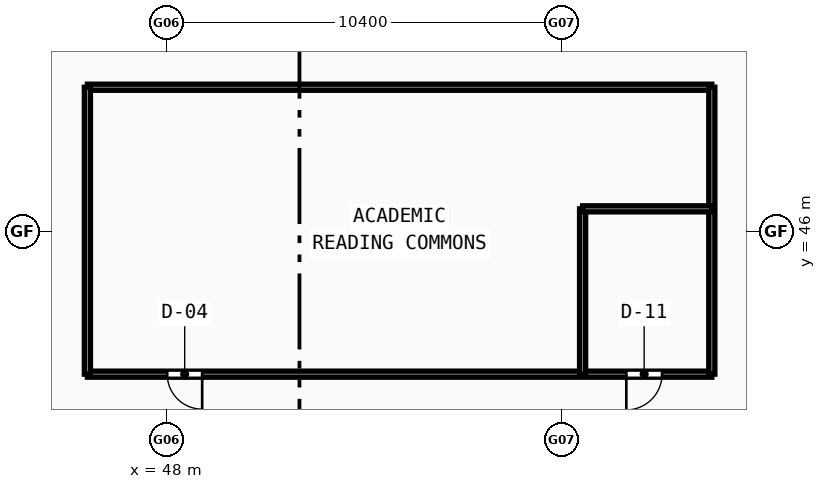
"""IFC4 building model, lengths in metres.
Left out: names, types, materials, properties, quantities, classifications, styles, units other than length and angle.
Written with IfcOpenShell. Run it as: python <this file> out.ifc"""

import sys

from ifc_helpers import new_model, si_unit, direction, frame, frame_2d, origin, place, context, subcontext, project, spatial, rectangle, extrude, source, transform, mapped, element, fill, save


model = new_model("IFC4")
c1 = context("Model", 3, precision=1e-05, world=origin(), true_north=direction((0.0, 1.0)))
c2 = subcontext(c1, "Body", "Model", "MODEL_VIEW")
j1 = project(units=[si_unit("LENGTHUNIT", "METRE"), si_unit("PLANEANGLEUNIT", "RADIAN")], contexts=[c1])
p1 = place(None, origin())
s1 = spatial("IfcSite", under=j1, at=p1, CompositionType="ELEMENT")
p2 = place(p1, origin())
s2 = spatial("IfcBuilding", under=s1, at=p2, CompositionType="ELEMENT")
p3 = place(p2, frame((0.0, 0.0, 84.98)))
s3 = spatial("IfcBuildingStorey", under=s2, at=p3, CompositionType="ELEMENT", Elevation=84.98)
p4 = place(p3, frame((45.92, 42.25, 0.0), z_axis=(0.0, 0.0, 1.0), x_axis=(1.0, 0.0, 0.0)))
e1 = element("IfcWall", 1, at=p4, inside=s3, PredefinedType="PARTITIONING", context=c2, shape_type="SweptSolid", body=[
    extrude(rectangle(XDim=16.43, YDim=0.16, at=frame_2d((8.215, 0.0))), origin(), (0.0, 0.0, 1.0), 2.84),
])
p5 = place(p4, frame((2.1, 0.0, 0.0)))
e2 = element("IfcOpeningElement", 2, at=p5, cuts=e1, PredefinedType="OPENING", context=c2, shape_type="SweptSolid", body=[
    extrude(rectangle(XDim=0.92, YDim=2.1, at=frame_2d((0.46, 1.05))), frame((0.0, 0.09, 0.0), z_axis=(0.0, -1.0, 0.0), x_axis=(1.0, 0.0, 0.0)), (0.0, 0.0, 1.0), 0.18),
])
p6 = place(p4, frame((14.18, 0.0, 0.0)))
e3 = element("IfcOpeningElement", 3, at=p6, cuts=e1, PredefinedType="OPENING", context=c2, shape_type="SweptSolid", body=[
    extrude(rectangle(XDim=0.94, YDim=2.1, at=frame_2d((0.47, 1.05))), frame((0.0, 0.09, 0.0), z_axis=(0.0, -1.0, 0.0), x_axis=(1.0, 0.0, 0.0)), (0.0, 0.0, 1.0), 0.18),
])
p7 = place(p3, frame((45.92, 49.8, 0.0), z_axis=(0.0, 0.0, 1.0), x_axis=(1.0, 0.0, 0.0)))
e4 = element("IfcWall", 4, at=p7, inside=s3, PredefinedType="PARTITIONING", context=c2, shape_type="SweptSolid", body=[
    extrude(rectangle(XDim=16.43, YDim=0.16, at=frame_2d((8.215, 0.0))), origin(), (0.0, 0.0, 1.0), 2.84),
])
p8 = place(p3, frame((45.92, 42.25, 0.0), z_axis=(0.0, 0.0, 1.0), x_axis=(0.0, 1.0, 0.0)))
e5 = element("IfcWall", 5, at=p8, inside=s3, PredefinedType="PARTITIONING", context=c2, shape_type="SweptSolid", body=[
    extrude(rectangle(XDim=7.55, YDim=0.16, at=frame_2d((3.775, 0.0))), origin(), (0.0, 0.0, 1.0), 3.54),
])
p9 = place(p3, frame((62.35, 42.25, 0.0), z_axis=(0.0, 0.0, 1.0), x_axis=(0.0, 1.0, 0.0)))
e6 = element("IfcWall", 6, at=p9, inside=s3, PredefinedType="PARTITIONING", context=c2, shape_type="SweptSolid", body=[
    extrude(rectangle(XDim=7.55, YDim=0.16, at=frame_2d((3.775, 0.0))), origin(), (0.0, 0.0, 1.0), 2.84),
])
p10 = place(p3, frame((58.95, 42.25, 0.0), z_axis=(0.0, 0.0, 1.0), x_axis=(0.0, 1.0, 0.0)))
e7 = element("IfcWall", 7, at=p10, inside=s3, PredefinedType="PARTITIONING", context=c2, shape_type="SweptSolid", body=[
    extrude(rectangle(XDim=4.35, YDim=0.16, at=frame_2d((2.175, 0.0))), origin(), (0.0, 0.0, 1.0), 2.84),
])
p11 = place(p3, frame((58.95, 46.6, 0.0), z_axis=(0.0, 0.0, 1.0), x_axis=(1.0, 0.0, 0.0)))
e8 = element("IfcWall", 8, at=p11, inside=s3, PredefinedType="PARTITIONING", context=c2, shape_type="SweptSolid", body=[
    extrude(rectangle(XDim=3.4, YDim=0.16, at=frame_2d((1.7, 0.0))), origin(), (0.0, 0.0, 1.0), 2.84),
])
m1 = source(origin(), c2, "Body", "SweptSolid", [
    extrude(rectangle(XDim=0.92, YDim=2.1, at=frame_2d((0.46, 1.05))), frame((0.0, 0.025, 0.0), z_axis=(0.0, -1.0, 0.0), x_axis=(1.0, 0.0, 0.0)), (0.0, 0.0, 1.0), 0.05),
])
p12 = place(p5, frame((0.92, 0.0, 0.0), z_axis=(0.0, 0.0, 1.0), x_axis=(-1.0, 0.0, 0.0)))
e9 = element("IfcDoor", 9, at=p12, inside=s3, OperationType="SINGLE_SWING_LEFT", PredefinedType="DOOR", context=c2, shape_type="MappedRepresentation", body=[
    mapped(m1, transform((0.0, 0.0, 0.0), scale=1.0)),
])
fill(e2, e9)
m2 = source(origin(), c2, "Body", "SweptSolid", [
    extrude(rectangle(XDim=0.94, YDim=2.1, at=frame_2d((0.47, 1.05))), frame((0.0, 0.025, 0.0), z_axis=(0.0, -1.0, 0.0), x_axis=(1.0, 0.0, 0.0)), (0.0, 0.0, 1.0), 0.05),
])
p13 = place(p6, frame((0.94, 0.0, 0.0), z_axis=(0.0, 0.0, 1.0), x_axis=(-1.0, 0.0, 0.0)))
e10 = element("IfcDoor", 10, at=p13, inside=s3, OperationType="SINGLE_SWING_RIGHT", PredefinedType="DOOR", context=c2, shape_type="MappedRepresentation", body=[
    mapped(m2, transform((0.0, 0.0, 0.0), scale=1.0)),
])
fill(e3, e10)
save(model, sys.argv[1])
